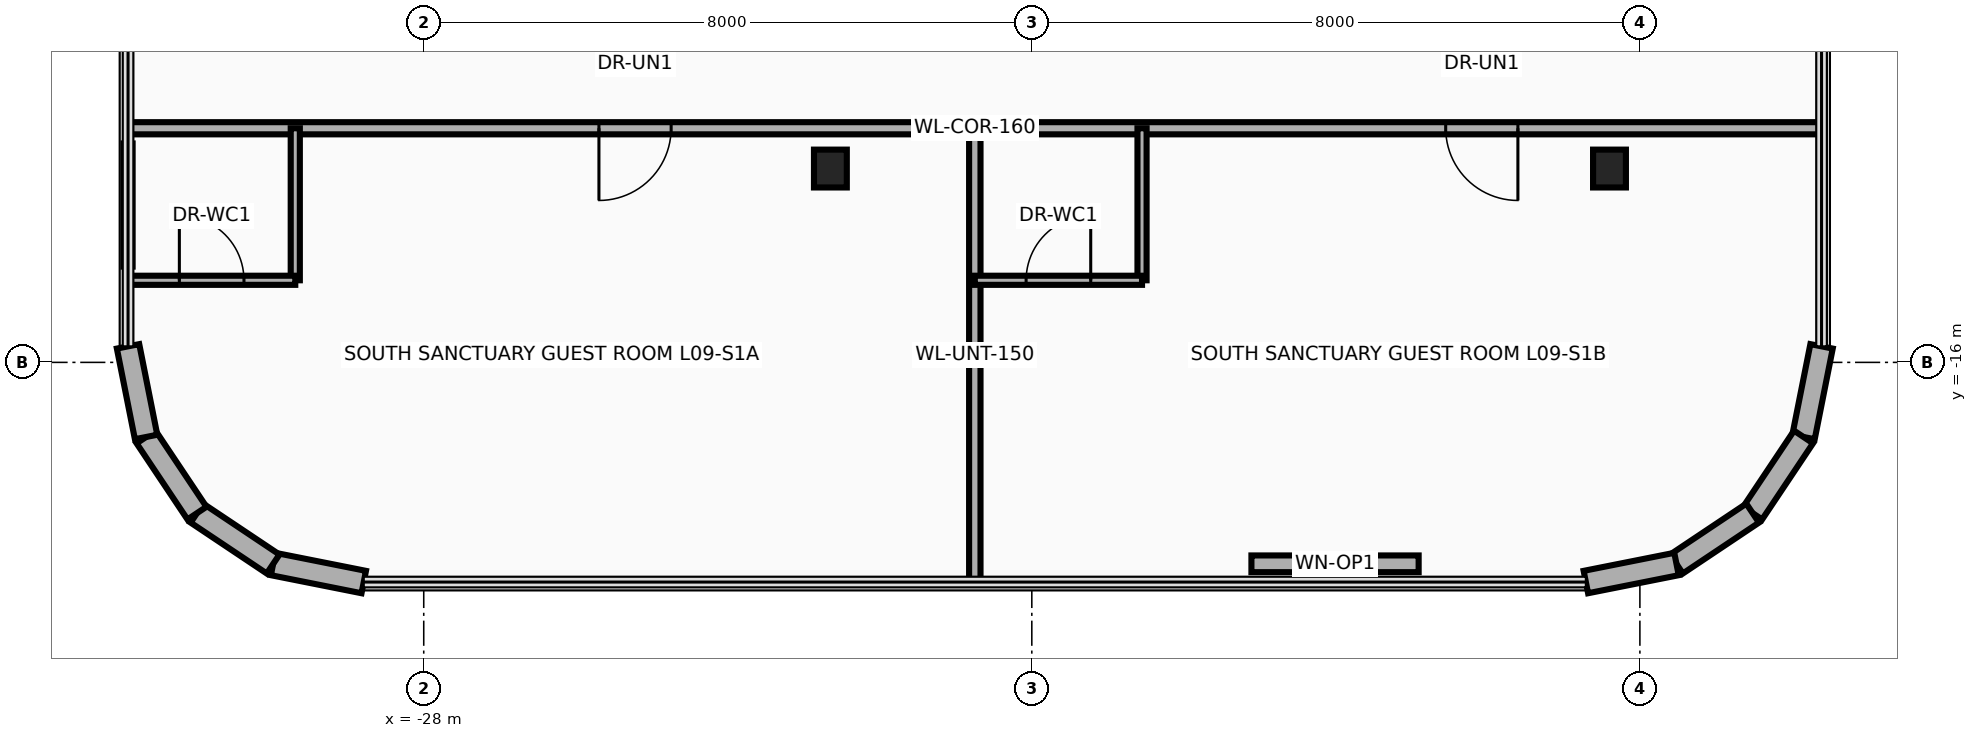
"""IFC4 building model, lengths in metres.
Left out: names, types, materials, properties, quantities, classifications, styles, units other than length and angle.
Written with IfcOpenShell. Run it as: python <this file> out.ifc"""

import sys

from ifc_helpers import new_model, si_unit, direction, frame, frame_2d, origin, origin_2d, place, context, subcontext, project, spatial, rectangle, i_section, extrude, source, transform, mapped, element, fill, save


model = new_model("IFC4")
c1 = context("Model", 3, precision=1e-05, world=origin(), true_north=direction((0.0, 1.0)))
c2 = subcontext(c1, "Body", "Model", "MODEL_VIEW")
j1 = project(units=[si_unit("LENGTHUNIT", "METRE"), si_unit("PLANEANGLEUNIT", "RADIAN")], contexts=[c1])
p1 = place(None, origin())
s1 = spatial("IfcSite", under=j1, at=p1, CompositionType="ELEMENT")
p2 = place(p1, origin())
s2 = spatial("IfcBuilding", under=s1, at=p2, CompositionType="ELEMENT")
p3 = place(p2, frame((0.0, 0.0, 40.8)))
s3 = spatial("IfcBuildingStorey", under=s2, at=p3, CompositionType="ELEMENT", Elevation=40.8)
m1 = source(origin(), c2, "Body", "SweptSolid", [
    extrude(i_section(OverallWidth=0.432, OverallDepth=0.498, WebThickness=0.056, FlangeThickness=0.089, at=origin_2d()), origin(), (0.0, 0.0, 1.0), 3.7),
])
for number, where, z_axis, x_axis in (
    (1, (-22.65, -13.45, 0.0), (0.0, 0.0, 1.0), (1.0, 0.0, 0.0)),
    (2, (-12.4, -13.45, 0.0), (0.0, 0.0, 1.0), (1.0, 0.0, 0.0)),
):
    element("IfcColumn", number, at=place(p3, frame(where, z_axis=z_axis, x_axis=x_axis)), inside=s3, PredefinedType="COLUMN", context=c2, shape_type="MappedRepresentation", body=[
        mapped(m1, transform((0.0, 0.0, 0.0), x_axis=(1.0, 0.0, 0.0), y_axis=(0.0, 1.0, 0.0), z_axis=(0.0, 0.0, 1.0), scale=1.0)),
    ])
p4 = place(p3, frame((-9.61, -15.789, 0.0), z_axis=(0.0, 0.0, 1.0), x_axis=(-0.194996050505, -0.980804027463, 0.0)))
e3 = element("IfcWall", 3, at=p4, inside=s3, PredefinedType="SOLIDWALL", context=c2, shape_type="SweptSolid", body=[
    extrude(rectangle(XDim=1.216, YDim=0.3, at=frame_2d((0.608, 0.0))), origin(), (0.0, 0.0, 1.0), 3.46),
])
for number, where, z_axis, x_axis in (
    (4, (-9.847, -16.982, 0.0), (0.0, 0.0, 1.0), (-0.556, -0.831, 0.0)),
    (5, (-10.517, -17.983, 0.0), (0.0, 0.0, 1.0), (-0.831, -0.556, 0.0)),
):
    element("IfcWall", number, at=place(p3, frame(where, z_axis=z_axis, x_axis=x_axis)), inside=s3, PredefinedType="SOLIDWALL", context=c2, shape_type="SweptSolid", body=[
        extrude(rectangle(XDim=1.205, YDim=0.3, at=frame_2d((0.603, 0.0))), origin(), (0.0, 0.0, 1.0), 3.46),
    ])
p5 = place(p3, frame((-11.518, -18.653, 0.0), z_axis=(0.0, 0.0, 1.0), x_axis=(-0.980804027463, -0.194996050505, 0.0)))
e6 = element("IfcWall", 6, at=p5, inside=s3, PredefinedType="SOLIDWALL", context=c2, shape_type="SweptSolid", body=[
    extrude(rectangle(XDim=1.216, YDim=0.3, at=frame_2d((0.608, 0.0))), origin(), (0.0, 0.0, 1.0), 3.46),
])
p6 = place(p3, frame((-14.911, -18.65, 0.0), z_axis=(0.0, 0.0, 1.0), x_axis=(-1.0, 0.0, 0.0)))
e7 = element("IfcWall", 7, at=p6, inside=s3, PredefinedType="SOLIDWALL", context=c2, shape_type="SweptSolid", body=[
    extrude(rectangle(XDim=2.2, YDim=0.22, at=frame_2d((1.1, 0.0))), origin(), (0.0, 0.0, 1.0), 3.46),
])
p7 = place(p6, frame((0.65, 0.0, 0.95)))
e8 = element("IfcOpeningElement", 8, at=p7, cuts=e7, PredefinedType="OPENING", context=c2, shape_type="SweptSolid", body=[
    extrude(rectangle(XDim=0.9, YDim=1.3, at=frame_2d((0.45, 0.65))), frame((0.0, 0.125, 0.0), z_axis=(0.0, -1.0, 0.0), x_axis=(1.0, 0.0, 0.0)), (0.0, 0.0, 1.0), 0.25),
])
p8 = place(p3, frame((-28.789, -18.89, 0.0), z_axis=(0.0, 0.0, 1.0), x_axis=(-0.980804027463, 0.194996050505, 0.0)))
e9 = element("IfcWall", 9, at=p8, inside=s3, PredefinedType="SOLIDWALL", context=c2, shape_type="SweptSolid", body=[
    extrude(rectangle(XDim=1.216, YDim=0.3, at=frame_2d((0.608, 0.0))), origin(), (0.0, 0.0, 1.0), 3.46),
])
for number, where, z_axis, x_axis in (
    (10, (-29.982, -18.653, 0.0), (0.0, 0.0, 1.0), (-0.831, 0.556, 0.0)),
    (11, (-30.983, -17.983, 0.0), (0.0, 0.0, 1.0), (-0.556, 0.831, 0.0)),
):
    element("IfcWall", number, at=place(p3, frame(where, z_axis=z_axis, x_axis=x_axis)), inside=s3, PredefinedType="SOLIDWALL", context=c2, shape_type="SweptSolid", body=[
        extrude(rectangle(XDim=1.205, YDim=0.3, at=frame_2d((0.603, 0.0))), origin(), (0.0, 0.0, 1.0), 3.46),
    ])
p9 = place(p3, frame((-31.653, -16.982, 0.0), z_axis=(0.0, 0.0, 1.0), x_axis=(-0.194996050505, 0.980804027463, 0.0)))
e12 = element("IfcWall", 12, at=p9, inside=s3, PredefinedType="SOLIDWALL", context=c2, shape_type="SweptSolid", body=[
    extrude(rectangle(XDim=1.216, YDim=0.3, at=frame_2d((0.608, 0.0))), origin(), (0.0, 0.0, 1.0), 3.46),
])
p10 = place(p3, frame((-31.89, -12.92, 0.0), z_axis=(0.0, 0.0, 1.0), x_axis=(1.0, 0.0, 0.0)))
e13 = element("IfcWall", 13, at=p10, inside=s3, PredefinedType="PARTITIONING", context=c2, shape_type="SweptSolid", body=[
    extrude(rectangle(XDim=22.28, YDim=0.16, at=frame_2d((11.14, 0.0))), origin(), (0.0, 0.0, 1.0), 2.834),
])
p11 = place(p10, frame((6.195, 0.0, 0.0)))
e14 = element("IfcOpeningElement", 14, at=p11, cuts=e13, PredefinedType="OPENING", context=c2, shape_type="SweptSolid", body=[
    extrude(rectangle(XDim=0.95, YDim=2.15, at=frame_2d((0.475, 1.075))), frame((0.0, 0.095, 0.0), z_axis=(0.0, -1.0, 0.0), x_axis=(1.0, 0.0, 0.0)), (0.0, 0.0, 1.0), 0.19),
])
p12 = place(p10, frame((17.335, 0.0, 0.0)))
e15 = element("IfcOpeningElement", 15, at=p12, cuts=e13, PredefinedType="OPENING", context=c2, shape_type="SweptSolid", body=[
    extrude(rectangle(XDim=0.95, YDim=2.15, at=frame_2d((0.475, 1.075))), frame((0.0, 0.095, 0.0), z_axis=(0.0, -1.0, 0.0), x_axis=(1.0, 0.0, 0.0)), (0.0, 0.0, 1.0), 0.19),
])
p13 = place(p3, frame((-20.75, -18.89, 0.0), z_axis=(0.0, 0.0, 1.0), x_axis=(0.0, 1.0, 0.0)))
e16 = element("IfcWall", 16, at=p13, inside=s3, PredefinedType="PARTITIONING", context=c2, shape_type="SweptSolid", body=[
    extrude(rectangle(XDim=5.97, YDim=0.15, at=frame_2d((2.985, 0.0))), origin(), (0.0, 0.0, 1.0), 2.896),
])
p14 = place(p3, frame((-29.69, -14.92, 0.0), z_axis=(0.0, 0.0, 1.0), x_axis=(0.0, 1.0, 0.0)))
e17 = element("IfcWall", 17, at=p14, inside=s3, PredefinedType="PARTITIONING", context=c2, shape_type="SweptSolid", body=[
    extrude(rectangle(XDim=2.0, YDim=0.12, at=frame_2d((1.0, 0.0))), origin(), (0.0, 0.0, 1.0), 3.46),
])
p15 = place(p3, frame((-31.89, -14.92, 0.0), z_axis=(0.0, 0.0, 1.0), x_axis=(1.0, 0.0, 0.0)))
e18 = element("IfcWall", 18, at=p15, inside=s3, PredefinedType="PARTITIONING", context=c2, shape_type="SweptSolid", body=[
    extrude(rectangle(XDim=2.2, YDim=0.12, at=frame_2d((1.1, 0.0))), origin(), (0.0, 0.0, 1.0), 3.46),
])
p16 = place(p15, frame((0.675, 0.0, 0.0)))
e19 = element("IfcOpeningElement", 19, at=p16, cuts=e18, PredefinedType="OPENING", context=c2, shape_type="SweptSolid", body=[
    extrude(rectangle(XDim=0.85, YDim=2.1, at=frame_2d((0.425, 1.05))), frame((0.0, 0.075, 0.0), z_axis=(0.0, -1.0, 0.0), x_axis=(1.0, 0.0, 0.0)), (0.0, 0.0, 1.0), 0.15),
])
p17 = place(p3, frame((-31.89, -14.74, 0.0), z_axis=(0.0, 0.0, 1.0), x_axis=(0.0, 1.0, 0.0)))
e20 = element("IfcWall", 20, at=p17, inside=s3, PredefinedType="PARTITIONING", context=c2, shape_type="SweptSolid", body=[
    extrude(rectangle(XDim=1.62, YDim=0.12, at=frame_2d((0.81, 0.0))), origin(), (0.0, 0.0, 1.0), 3.46),
])
p18 = place(p3, frame((-18.55, -14.92, 0.0), z_axis=(0.0, 0.0, 1.0), x_axis=(0.0, 1.0, 0.0)))
e21 = element("IfcWall", 21, at=p18, inside=s3, PredefinedType="PARTITIONING", context=c2, shape_type="SweptSolid", body=[
    extrude(rectangle(XDim=2.0, YDim=0.12, at=frame_2d((1.0, 0.0))), origin(), (0.0, 0.0, 1.0), 2.896),
])
p19 = place(p3, frame((-20.75, -14.92, 0.0), z_axis=(0.0, 0.0, 1.0), x_axis=(1.0, 0.0, 0.0)))
e22 = element("IfcWall", 22, at=p19, inside=s3, PredefinedType="PARTITIONING", context=c2, shape_type="SweptSolid", body=[
    extrude(rectangle(XDim=2.2, YDim=0.12, at=frame_2d((1.1, 0.0))), origin(), (0.0, 0.0, 1.0), 3.46),
])
p20 = place(p19, frame((0.675, 0.0, 0.0)))
e23 = element("IfcOpeningElement", 23, at=p20, cuts=e22, PredefinedType="OPENING", context=c2, shape_type="SweptSolid", body=[
    extrude(rectangle(XDim=0.85, YDim=2.1, at=frame_2d((0.425, 1.05))), frame((0.0, 0.075, 0.0), z_axis=(0.0, -1.0, 0.0), x_axis=(1.0, 0.0, 0.0)), (0.0, 0.0, 1.0), 0.15),
])
p21 = place(p7, origin())
e24 = element("IfcWindow", 24, at=p21, inside=s3, PartitioningType="SINGLE_PANEL", PredefinedType="WINDOW", context=c2, shape_type="SweptSolid", body=[
    extrude(rectangle(XDim=0.9, YDim=1.3, at=frame_2d((0.45, 0.65))), frame((0.0, 0.03, 0.0), z_axis=(0.0, -1.0, 0.0), x_axis=(1.0, 0.0, 0.0)), (0.0, 0.0, 1.0), 0.06),
])
fill(e8, e24)
p22 = place(p11, frame((0.95, 0.0, 0.0), z_axis=(0.0, 0.0, 1.0), x_axis=(-1.0, 0.0, 0.0)))
e25 = element("IfcDoor", 25, at=p22, inside=s3, OperationType="SINGLE_SWING_LEFT", PredefinedType="DOOR", context=c2, shape_type="SweptSolid", body=[
    extrude(rectangle(XDim=0.95, YDim=2.15, at=frame_2d((0.475, 1.075))), frame((0.0, 0.025, 0.0), z_axis=(0.0, -1.0, 0.0), x_axis=(1.0, 0.0, 0.0)), (0.0, 0.0, 1.0), 0.05),
])
fill(e14, e25)
p23 = place(p16, origin())
e26 = element("IfcDoor", 26, at=p23, inside=s3, OperationType="SINGLE_SWING_RIGHT", PredefinedType="DOOR", context=c2, shape_type="SweptSolid", body=[
    extrude(rectangle(XDim=0.85, YDim=2.1, at=frame_2d((0.425, 1.05))), frame((0.0, 0.025, 0.0), z_axis=(0.0, -1.0, 0.0), x_axis=(1.0, 0.0, 0.0)), (0.0, 0.0, 1.0), 0.05),
])
fill(e19, e26)
p24 = place(p12, frame((0.95, 0.0, 0.0), z_axis=(0.0, 0.0, 1.0), x_axis=(-1.0, 0.0, 0.0)))
e27 = element("IfcDoor", 27, at=p24, inside=s3, OperationType="SINGLE_SWING_LEFT", PredefinedType="DOOR", context=c2, shape_type="SweptSolid", body=[
    extrude(rectangle(XDim=0.95, YDim=2.15, at=frame_2d((0.475, 1.075))), frame((0.0, 0.025, 0.0), z_axis=(0.0, -1.0, 0.0), x_axis=(1.0, 0.0, 0.0)), (0.0, 0.0, 1.0), 0.05),
])
fill(e15, e27)
p25 = place(p20, origin())
e28 = element("IfcDoor", 28, at=p25, inside=s3, OperationType="SINGLE_SWING_RIGHT", PredefinedType="DOOR", context=c2, shape_type="SweptSolid", body=[
    extrude(rectangle(XDim=0.85, YDim=2.1, at=frame_2d((0.425, 1.05))), frame((0.0, 0.025, 0.0), z_axis=(0.0, -1.0, 0.0), x_axis=(1.0, 0.0, 0.0)), (0.0, 0.0, 1.0), 0.05),
])
fill(e23, e28)
save(model, sys.argv[1])
